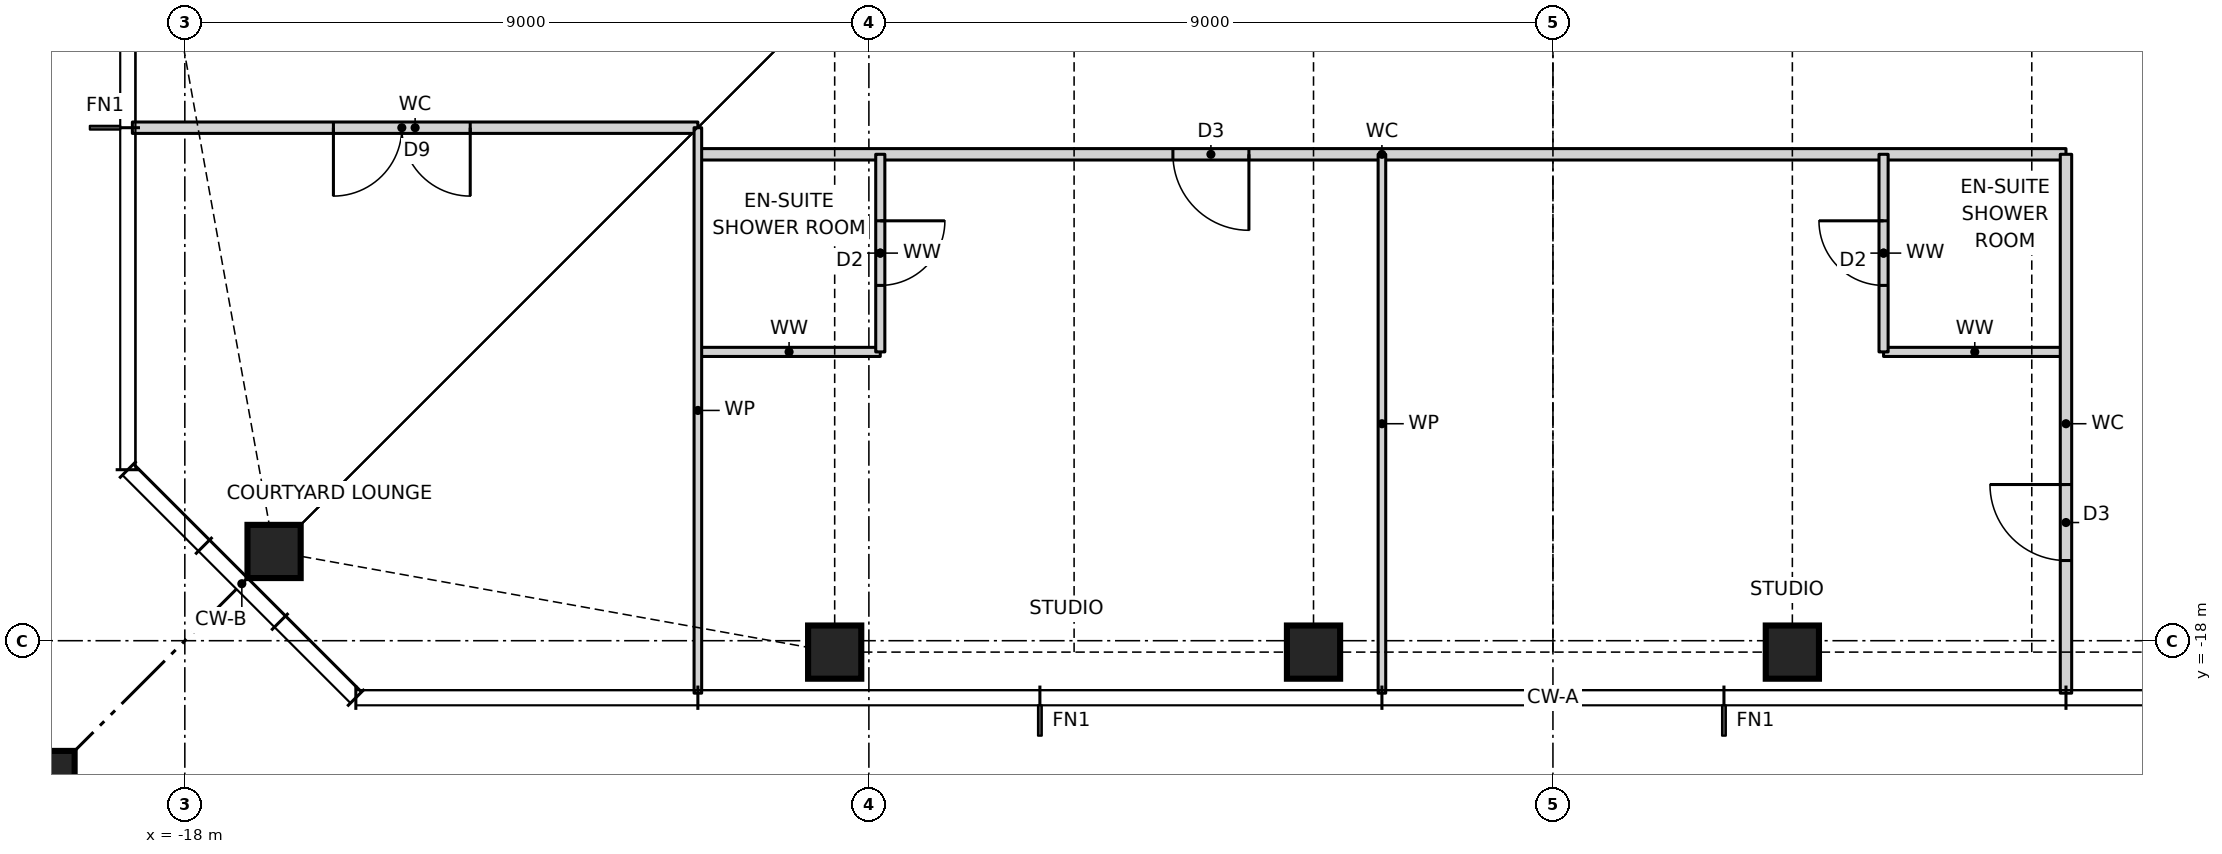
"""IFC4 building model, lengths in metres.
Left out: names, types, materials, properties, quantities, classifications, styles, units other than length and angle.
Written with IfcOpenShell. Run it as: python <this file> out.ifc"""

import sys

from ifc_helpers import new_model, si_unit, direction, frame, frame_2d, origin, origin_2d, place, context, subcontext, project, spatial, rectangle, hollow_rectangle, i_section, extrude, element, fill, save


model = new_model("IFC4")
c1 = context("Model", 3, precision=1e-05, world=origin(), true_north=direction((0.0, 1.0)))
c2 = subcontext(c1, "Body", "Model", "MODEL_VIEW")
j1 = project(units=[si_unit("LENGTHUNIT", "METRE"), si_unit("PLANEANGLEUNIT", "RADIAN")], contexts=[c1])
p1 = place(None, origin())
s1 = spatial("IfcSite", under=j1, at=p1, CompositionType="ELEMENT")
p2 = place(p1, origin())
s2 = spatial("IfcBuilding", under=s1, at=p2, CompositionType="ELEMENT")
p3 = place(p2, frame((0.0, 0.0, 202.0)))
s3 = spatial("IfcBuildingStorey", under=s2, at=p3, CompositionType="ELEMENT", Elevation=202.0)
for number, where, z_axis, x_axis in (
    (1, (-16.826, -16.826, 0.0), (0.0, 0.0, 1.0), (1.0, 0.0, 0.0)),
    (2, (-9.45, -18.15, 0.0), (0.0, 0.0, 1.0), (1.0, 0.0, 0.0)),
    (3, (-3.15, -18.15, 0.0), (0.0, 0.0, 1.0), (1.0, 0.0, 0.0)),
    (4, (3.15, -18.15, 0.0), (0.0, 0.0, 1.0), (1.0, 0.0, 0.0)),
):
    element("IfcColumn", number, at=place(p3, frame(where, z_axis=z_axis, x_axis=x_axis)), inside=s3, PredefinedType="COLUMN", context=c2, shape_type="SweptSolid", body=[
        extrude(hollow_rectangle(XDim=0.7, YDim=0.7, WallThickness=0.06, at=origin_2d()), origin(), (0.0, 0.0, 1.0), 3.5),
    ])
p4 = place(p3, frame((-21.65, -21.65, 0.0), z_axis=(0.0, 0.0, 1.0), x_axis=(1.0, 0.0, 0.0)))
e5 = element("IfcColumn", 5, at=p4, inside=s3, PredefinedType="COLUMN", context=c2, shape_type="SweptSolid", body=[
    extrude(rectangle(XDim=4.4, YDim=4.4, at=origin_2d()), origin(), (0.0, 0.0, 1.0), 3.5),
    extrude(i_section(OverallWidth=0.478, OverallDepth=0.599, WebThickness=0.1, FlangeThickness=0.14, at=origin_2d()), origin(), (0.0, 0.0, 1.0), 3.5),
])
for number, where, z_axis, x_axis in (
    (6, (-11.25, -14.2, 0.0), (0.0, 0.0, 1.0), (1.0, 0.0, 0.0)),
    (7, (4.35, -14.2, 0.0), (0.0, 0.0, 1.0), (1.0, 0.0, 0.0)),
):
    element("IfcWall", number, at=place(p3, frame(where, z_axis=z_axis, x_axis=x_axis)), inside=s3, PredefinedType="PARTITIONING", context=c2, shape_type="SweptSolid", body=[
        extrude(rectangle(XDim=2.4, YDim=0.12, at=frame_2d((1.2, 0.0))), origin(), (0.0, 0.0, 1.0), 3.27),
    ])
p5 = place(p3, frame((-11.25, -11.6, 0.0), z_axis=(0.0, 0.0, 1.0), x_axis=(1.0, 0.0, 0.0)))
e8 = element("IfcWall", 8, at=p5, inside=s3, PredefinedType="PARTITIONING", context=c2, shape_type="SweptSolid", body=[
    extrude(rectangle(XDim=18.0, YDim=0.15, at=frame_2d((9.0, 0.0))), origin(), (0.0, 0.0, 1.0), 3.27),
])
p6 = place(p5, frame((6.25, 0.0, 0.0)))
e9 = element("IfcOpeningElement", 9, at=p6, cuts=e8, PredefinedType="OPENING", context=c2, shape_type="SweptSolid", body=[
    extrude(rectangle(XDim=1.0, YDim=2.1, at=frame_2d((0.5, 1.05))), frame((0.0, 0.085, 0.0), z_axis=(0.0, -1.0, 0.0), x_axis=(1.0, 0.0, 0.0)), (0.0, 0.0, 1.0), 0.17),
])
p7 = place(p3, frame((-18.69, -11.25, 0.0), z_axis=(0.0, 0.0, 1.0), x_axis=(1.0, 0.0, 0.0)))
e10 = element("IfcWall", 10, at=p7, inside=s3, PredefinedType="PARTITIONING", context=c2, shape_type="SweptSolid", body=[
    extrude(rectangle(XDim=7.44, YDim=0.15, at=frame_2d((3.72, 0.0))), origin(), (0.0, 0.0, 1.0), 3.27),
])
p8 = place(p7, frame((2.645, 0.0, 0.0)))
e11 = element("IfcOpeningElement", 11, at=p8, cuts=e10, PredefinedType="OPENING", context=c2, shape_type="SweptSolid", body=[
    extrude(rectangle(XDim=1.8, YDim=2.1, at=frame_2d((0.9, 1.05))), frame((0.0, 0.085, 0.0), z_axis=(0.0, -1.0, 0.0), x_axis=(1.0, 0.0, 0.0)), (0.0, 0.0, 1.0), 0.17),
])
p9 = place(p3, frame((6.75, -18.69, 0.0), z_axis=(0.0, 0.0, 1.0), x_axis=(0.0, 1.0, 0.0)))
e12 = element("IfcWall", 12, at=p9, inside=s3, PredefinedType="PARTITIONING", context=c2, shape_type="SweptSolid", body=[
    extrude(rectangle(XDim=7.09, YDim=0.15, at=frame_2d((3.545, 0.0))), origin(), (0.0, 0.0, 1.0), 3.27),
])
p10 = place(p9, frame((1.745, 0.0, 0.0)))
e13 = element("IfcOpeningElement", 13, at=p10, cuts=e12, PredefinedType="OPENING", context=c2, shape_type="SweptSolid", body=[
    extrude(rectangle(XDim=1.0, YDim=2.1, at=frame_2d((0.5, 1.05))), frame((0.0, 0.085, 0.0), z_axis=(0.0, -1.0, 0.0), x_axis=(1.0, 0.0, 0.0)), (0.0, 0.0, 1.0), 0.17),
])
p11 = place(p3, frame((4.35, -14.2, 0.0), z_axis=(0.0, 0.0, 1.0), x_axis=(0.0, 1.0, 0.0)))
e14 = element("IfcWall", 14, at=p11, inside=s3, PredefinedType="PARTITIONING", context=c2, shape_type="SweptSolid", body=[
    extrude(rectangle(XDim=2.6, YDim=0.12, at=frame_2d((1.3, 0.0))), origin(), (0.0, 0.0, 1.0), 3.27),
])
p12 = place(p11, frame((0.875, 0.0, 0.0)))
e15 = element("IfcOpeningElement", 15, at=p12, cuts=e14, PredefinedType="OPENING", context=c2, shape_type="SweptSolid", body=[
    extrude(rectangle(XDim=0.85, YDim=2.1, at=frame_2d((0.425, 1.05))), frame((0.0, 0.07, 0.0), z_axis=(0.0, -1.0, 0.0), x_axis=(1.0, 0.0, 0.0)), (0.0, 0.0, 1.0), 0.14),
])
p13 = place(p3, frame((-2.25, -18.69, 0.0), z_axis=(0.0, 0.0, 1.0), x_axis=(0.0, 1.0, 0.0)))
e16 = element("IfcWall", 16, at=p13, inside=s3, PredefinedType="PARTITIONING", context=c2, shape_type="SweptSolid", body=[
    extrude(rectangle(XDim=7.09, YDim=0.1, at=frame_2d((3.545, 0.0))), origin(), (0.0, 0.0, 1.0), 3.27),
])
p14 = place(p3, frame((-8.85, -14.2, 0.0), z_axis=(0.0, 0.0, 1.0), x_axis=(0.0, 1.0, 0.0)))
e17 = element("IfcWall", 17, at=p14, inside=s3, PredefinedType="PARTITIONING", context=c2, shape_type="SweptSolid", body=[
    extrude(rectangle(XDim=2.6, YDim=0.12, at=frame_2d((1.3, 0.0))), origin(), (0.0, 0.0, 1.0), 3.27),
])
p15 = place(p14, frame((0.875, 0.0, 0.0)))
e18 = element("IfcOpeningElement", 18, at=p15, cuts=e17, PredefinedType="OPENING", context=c2, shape_type="SweptSolid", body=[
    extrude(rectangle(XDim=0.85, YDim=2.1, at=frame_2d((0.425, 1.05))), frame((0.0, 0.07, 0.0), z_axis=(0.0, -1.0, 0.0), x_axis=(1.0, 0.0, 0.0)), (0.0, 0.0, 1.0), 0.14),
])
p16 = place(p3, frame((-11.25, -18.69, 0.0), z_axis=(0.0, 0.0, 1.0), x_axis=(0.0, 1.0, 0.0)))
e19 = element("IfcWall", 19, at=p16, inside=s3, PredefinedType="PARTITIONING", context=c2, shape_type="SweptSolid", body=[
    extrude(rectangle(XDim=7.44, YDim=0.1, at=frame_2d((3.72, 0.0))), origin(), (0.0, 0.0, 1.0), 3.27),
])
p17 = place(p6, frame((1.0, 0.0, 0.0), z_axis=(0.0, 0.0, 1.0), x_axis=(-1.0, 0.0, 0.0)))
e20 = element("IfcDoor", 20, at=p17, inside=s3, OperationType="SINGLE_SWING_LEFT", PredefinedType="DOOR", context=c2, shape_type="SweptSolid", body=[
    extrude(rectangle(XDim=1.0, YDim=2.1, at=frame_2d((0.5, 1.05))), frame((0.0, 0.025, 0.0), z_axis=(0.0, -1.0, 0.0), x_axis=(1.0, 0.0, 0.0)), (0.0, 0.0, 1.0), 0.05),
])
fill(e9, e20)
p18 = place(p15, frame((0.85, 0.0, 0.0), z_axis=(0.0, 0.0, 1.0), x_axis=(-1.0, 0.0, 0.0)))
e21 = element("IfcDoor", 21, at=p18, inside=s3, OperationType="SINGLE_SWING_LEFT", PredefinedType="DOOR", context=c2, shape_type="SweptSolid", body=[
    extrude(rectangle(XDim=0.85, YDim=2.1, at=frame_2d((0.425, 1.05))), frame((0.0, 0.025, 0.0), z_axis=(0.0, -1.0, 0.0), x_axis=(1.0, 0.0, 0.0)), (0.0, 0.0, 1.0), 0.05),
])
fill(e18, e21)
p19 = place(p10, origin())
e22 = element("IfcDoor", 22, at=p19, inside=s3, OperationType="SINGLE_SWING_RIGHT", PredefinedType="DOOR", context=c2, shape_type="SweptSolid", body=[
    extrude(rectangle(XDim=1.0, YDim=2.1, at=frame_2d((0.5, 1.05))), frame((0.0, 0.025, 0.0), z_axis=(0.0, -1.0, 0.0), x_axis=(1.0, 0.0, 0.0)), (0.0, 0.0, 1.0), 0.05),
])
fill(e13, e22)
p20 = place(p12, origin())
e23 = element("IfcDoor", 23, at=p20, inside=s3, OperationType="SINGLE_SWING_RIGHT", PredefinedType="DOOR", context=c2, shape_type="SweptSolid", body=[
    extrude(rectangle(XDim=0.85, YDim=2.1, at=frame_2d((0.425, 1.05))), frame((0.0, 0.025, 0.0), z_axis=(0.0, -1.0, 0.0), x_axis=(1.0, 0.0, 0.0)), (0.0, 0.0, 1.0), 0.05),
])
fill(e15, e23)
p21 = place(p8, frame((1.8, 0.0, 0.0), z_axis=(0.0, 0.0, 1.0), x_axis=(-1.0, 0.0, 0.0)))
e24 = element("IfcDoor", 24, at=p21, inside=s3, OperationType="DOUBLE_DOOR_SINGLE_SWING", PredefinedType="DOOR", context=c2, shape_type="SweptSolid", body=[
    extrude(rectangle(XDim=1.8, YDim=2.1, at=frame_2d((0.9, 1.05))), frame((0.0, 0.025, 0.0), z_axis=(0.0, -1.0, 0.0), x_axis=(1.0, 0.0, 0.0)), (0.0, 0.0, 1.0), 0.05),
])
fill(e11, e24)
save(model, sys.argv[1])
